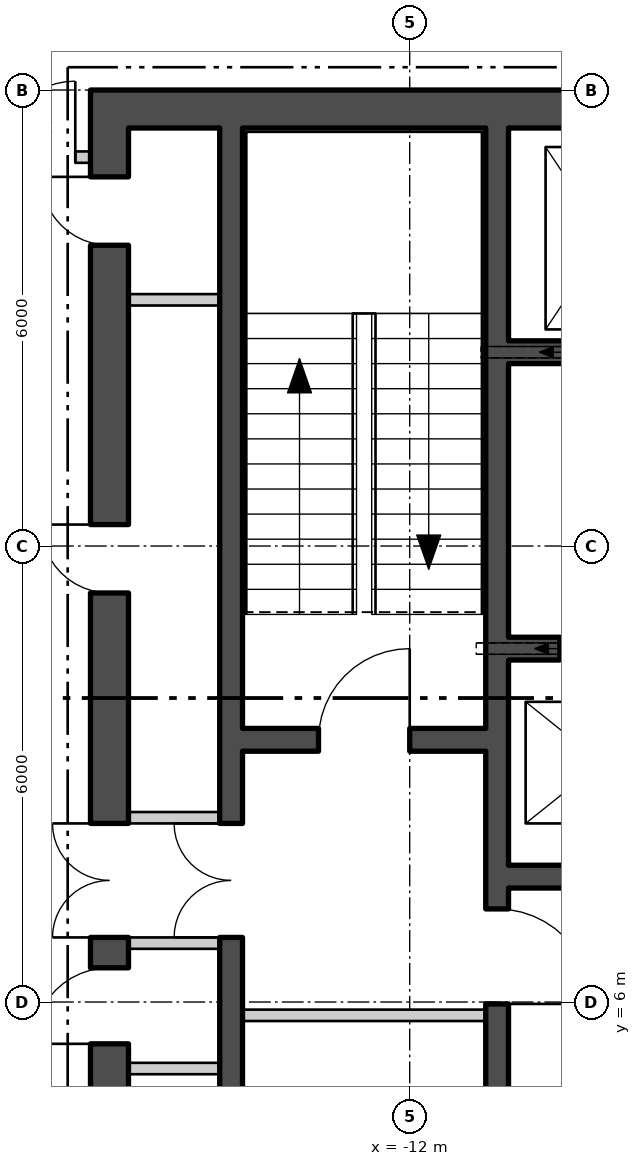
"""IFC4 building model, lengths in metres.
Left out: names, types, materials, properties, quantities, classifications, styles, units other than length and angle.
Written with IfcOpenShell. Run it as: python <this file> out.ifc"""

import sys

from ifc_helpers import new_model, si_unit, direction, frame, frame_2d, origin, place, context, subcontext, project, spatial, polyline, rectangle, outline, extrude, element, fill, save


model = new_model("IFC4")
c1 = context("Model", 3, precision=1e-05, world=origin(), true_north=direction((0.0, 1.0)))
c2 = subcontext(c1, "Body", "Model", "MODEL_VIEW")
j1 = project(units=[si_unit("LENGTHUNIT", "METRE"), si_unit("PLANEANGLEUNIT", "RADIAN")], contexts=[c1])
p1 = place(None, origin())
s1 = spatial("IfcSite", under=j1, at=p1, CompositionType="ELEMENT")
p2 = place(p1, origin())
s2 = spatial("IfcBuilding", under=s1, at=p2, CompositionType="ELEMENT")
p3 = place(p2, frame((0.0, 0.0, 139.8)))
s3 = spatial("IfcBuildingStorey", under=s2, at=p3, CompositionType="ELEMENT", Elevation=139.8)
p4 = place(p3, frame((-27.235, 12.423, -0.18), z_axis=(0.0, 0.0, 1.0), x_axis=(0.500000335318, -0.866025210188, 0.0)))
e1 = element("IfcWall", 1, at=p4, inside=s3, PredefinedType="SOLIDWALL", context=c2, shape_type="SweptSolid", body=[
    extrude(outline(polyline([(-0.13, -0.225), (45.88, -0.225), (45.62, 0.225), (0.13, 0.225), (-0.13, -0.225)])), origin(), (0.0, 0.0, 1.0), 3.68),
])
p5 = place(p4, frame((1.425, 0.0, 1.08)))
e2 = element("IfcOpeningElement", 2, at=p5, cuts=e1, PredefinedType="OPENING", context=c2, shape_type="SweptSolid", body=[
    extrude(rectangle(XDim=2.4, YDim=2.0, at=frame_2d((1.2, 1.0))), frame((0.0, 0.235, 0.0), z_axis=(0.0, -1.0, 0.0), x_axis=(1.0, 0.0, 0.0)), (0.0, 0.0, 1.0), 0.47),
])
p6 = place(p4, frame((5.895, 0.0, 1.08)))
e3 = element("IfcOpeningElement", 3, at=p6, cuts=e1, PredefinedType="OPENING", context=c2, shape_type="SweptSolid", body=[
    extrude(rectangle(XDim=2.4, YDim=2.0, at=frame_2d((1.2, 1.0))), frame((0.0, 0.235, 0.0), z_axis=(0.0, -1.0, 0.0), x_axis=(1.0, 0.0, 0.0)), (0.0, 0.0, 1.0), 0.47),
])
p7 = place(p4, frame((10.403, 0.0, 1.08)))
e4 = element("IfcOpeningElement", 4, at=p7, cuts=e1, PredefinedType="OPENING", context=c2, shape_type="SweptSolid", body=[
    extrude(rectangle(XDim=2.4, YDim=2.0, at=frame_2d((1.2, 1.0))), frame((0.0, 0.235, 0.0), z_axis=(0.0, -1.0, 0.0), x_axis=(1.0, 0.0, 0.0)), (0.0, 0.0, 1.0), 0.47),
])
p8 = place(p4, frame((14.912, 0.0, 1.08)))
e5 = element("IfcOpeningElement", 5, at=p8, cuts=e1, PredefinedType="OPENING", context=c2, shape_type="SweptSolid", body=[
    extrude(rectangle(XDim=2.4, YDim=2.0, at=frame_2d((1.2, 1.0))), frame((0.0, 0.235, 0.0), z_axis=(0.0, -1.0, 0.0), x_axis=(1.0, 0.0, 0.0)), (0.0, 0.0, 1.0), 0.47),
])
p9 = place(p4, frame((19.421, 0.0, 1.08)))
e6 = element("IfcOpeningElement", 6, at=p9, cuts=e1, PredefinedType="OPENING", context=c2, shape_type="SweptSolid", body=[
    extrude(rectangle(XDim=2.4, YDim=2.0, at=frame_2d((1.2, 1.0))), frame((0.0, 0.235, 0.0), z_axis=(0.0, -1.0, 0.0), x_axis=(1.0, 0.0, 0.0)), (0.0, 0.0, 1.0), 0.47),
])
p10 = place(p4, frame((23.929, 0.0, 1.08)))
e7 = element("IfcOpeningElement", 7, at=p10, cuts=e1, PredefinedType="OPENING", context=c2, shape_type="SweptSolid", body=[
    extrude(rectangle(XDim=2.4, YDim=2.0, at=frame_2d((1.2, 1.0))), frame((0.0, 0.235, 0.0), z_axis=(0.0, -1.0, 0.0), x_axis=(1.0, 0.0, 0.0)), (0.0, 0.0, 1.0), 0.47),
])
p11 = place(p4, frame((28.438, 0.0, 1.08)))
e8 = element("IfcOpeningElement", 8, at=p11, cuts=e1, PredefinedType="OPENING", context=c2, shape_type="SweptSolid", body=[
    extrude(rectangle(XDim=2.4, YDim=2.0, at=frame_2d((1.2, 1.0))), frame((0.0, 0.235, 0.0), z_axis=(0.0, -1.0, 0.0), x_axis=(1.0, 0.0, 0.0)), (0.0, 0.0, 1.0), 0.47),
])
p12 = place(p4, frame((32.947, 0.0, 1.08)))
e9 = element("IfcOpeningElement", 9, at=p12, cuts=e1, PredefinedType="OPENING", context=c2, shape_type="SweptSolid", body=[
    extrude(rectangle(XDim=2.4, YDim=2.0, at=frame_2d((1.2, 1.0))), frame((0.0, 0.235, 0.0), z_axis=(0.0, -1.0, 0.0), x_axis=(1.0, 0.0, 0.0)), (0.0, 0.0, 1.0), 0.47),
])
p13 = place(p4, frame((37.455, 0.0, 1.08)))
e10 = element("IfcOpeningElement", 10, at=p13, cuts=e1, PredefinedType="OPENING", context=c2, shape_type="SweptSolid", body=[
    extrude(rectangle(XDim=2.4, YDim=2.0, at=frame_2d((1.2, 1.0))), frame((0.0, 0.235, 0.0), z_axis=(0.0, -1.0, 0.0), x_axis=(1.0, 0.0, 0.0)), (0.0, 0.0, 1.0), 0.47),
])
p14 = place(p4, frame((41.925, 0.0, 1.08)))
e11 = element("IfcOpeningElement", 11, at=p14, cuts=e1, PredefinedType="OPENING", context=c2, shape_type="SweptSolid", body=[
    extrude(rectangle(XDim=2.4, YDim=2.0, at=frame_2d((1.2, 1.0))), frame((0.0, 0.235, 0.0), z_axis=(0.0, -1.0, 0.0), x_axis=(1.0, 0.0, 0.0)), (0.0, 0.0, 1.0), 0.47),
])
p15 = place(p3, frame((-16.2, 17.75, 0.0), z_axis=(0.0, 0.0, 1.0), x_axis=(1.0, 0.0, 0.0)))
e12 = element("IfcWall", 12, at=p15, inside=s3, PredefinedType="SHEAR", context=c2, shape_type="SweptSolid", body=[
    extrude(rectangle(XDim=32.4, YDim=0.5, at=frame_2d((16.2, 0.0))), origin(), (0.0, 0.0, 1.0), 3.7),
])
p16 = place(p3, frame((-15.95, 2.5, 0.0), z_axis=(0.0, 0.0, 1.0), x_axis=(0.0, 1.0, 0.0)))
e13 = element("IfcWall", 13, at=p16, inside=s3, PredefinedType="SHEAR", context=c2, shape_type="SweptSolid", body=[
    extrude(rectangle(XDim=15.0, YDim=0.5, at=frame_2d((7.5, 0.0))), origin(), (0.0, 0.0, 1.0), 3.7),
])
p17 = place(p16, frame((4.35, 0.0, 0.0)))
e14 = element("IfcOpeningElement", 14, at=p17, cuts=e13, PredefinedType="OPENING", context=c2, shape_type="SweptSolid", body=[
    extrude(rectangle(XDim=1.5, YDim=2.1, at=frame_2d((0.75, 1.05))), frame((0.0, 0.26, 0.0), z_axis=(0.0, -1.0, 0.0), x_axis=(1.0, 0.0, 0.0)), (0.0, 0.0, 1.0), 0.52),
])
p18 = place(p16, frame((0.825, 0.0, 0.0)))
e15 = element("IfcOpeningElement", 15, at=p18, cuts=e13, PredefinedType="OPENING", context=c2, shape_type="SweptSolid", body=[
    extrude(rectangle(XDim=0.9, YDim=2.1, at=frame_2d((0.45, 1.05))), frame((0.0, 0.26, 0.0), z_axis=(0.0, -1.0, 0.0), x_axis=(1.0, 0.0, 0.0)), (0.0, 0.0, 1.0), 0.52),
])
p19 = place(p16, frame((2.95, 0.0, 0.0)))
e16 = element("IfcOpeningElement", 16, at=p19, cuts=e13, PredefinedType="OPENING", context=c2, shape_type="SweptSolid", body=[
    extrude(rectangle(XDim=1.0, YDim=2.1, at=frame_2d((0.5, 1.05))), frame((0.0, 0.26, 0.0), z_axis=(0.0, -1.0, 0.0), x_axis=(1.0, 0.0, 0.0)), (0.0, 0.0, 1.0), 0.52),
])
p20 = place(p16, frame((8.882, 0.0, 0.0)))
e17 = element("IfcOpeningElement", 17, at=p20, cuts=e13, PredefinedType="OPENING", context=c2, shape_type="SweptSolid", body=[
    extrude(rectangle(XDim=0.9, YDim=2.1, at=frame_2d((0.45, 1.05))), frame((0.0, 0.26, 0.0), z_axis=(0.0, -1.0, 0.0), x_axis=(1.0, 0.0, 0.0)), (0.0, 0.0, 1.0), 0.52),
])
p21 = place(p16, frame((13.457, 0.0, 0.0)))
e18 = element("IfcOpeningElement", 18, at=p21, cuts=e13, PredefinedType="OPENING", context=c2, shape_type="SweptSolid", body=[
    extrude(rectangle(XDim=0.9, YDim=2.1, at=frame_2d((0.45, 1.05))), frame((0.0, 0.26, 0.0), z_axis=(0.0, -1.0, 0.0), x_axis=(1.0, 0.0, 0.0)), (0.0, 0.0, 1.0), 0.52),
])
p22 = place(p3, frame((-10.85, 2.5, 0.0), z_axis=(0.0, 0.0, 1.0), x_axis=(0.0, 1.0, 0.0)))
e19 = element("IfcWall", 19, at=p22, inside=s3, PredefinedType="SHEAR", context=c2, shape_type="SweptSolid", body=[
    extrude(rectangle(XDim=15.0, YDim=0.3, at=frame_2d((7.5, 0.0))), origin(), (0.0, 0.0, 1.0), 3.7),
])
p23 = place(p22, frame((3.475, 0.0, 0.0)))
e20 = element("IfcOpeningElement", 20, at=p23, cuts=e19, PredefinedType="OPENING", context=c2, shape_type="SweptSolid", body=[
    extrude(rectangle(XDim=1.25, YDim=2.1, at=frame_2d((0.625, 1.05))), frame((0.0, 0.16, 0.0), z_axis=(0.0, -1.0, 0.0), x_axis=(1.0, 0.0, 0.0)), (0.0, 0.0, 1.0), 0.32),
])
p24 = place(p22, frame((1.125, 0.0, 0.0)))
e21 = element("IfcOpeningElement", 21, at=p24, cuts=e19, PredefinedType="OPENING", context=c2, shape_type="SweptSolid", body=[
    extrude(rectangle(XDim=1.0, YDim=2.1, at=frame_2d((0.5, 1.05))), frame((0.0, 0.16, 0.0), z_axis=(0.0, -1.0, 0.0), x_axis=(1.0, 0.0, 0.0)), (0.0, 0.0, 1.0), 0.32),
])
p25 = place(p3, frame((-14.35, 2.5, 0.0), z_axis=(0.0, 0.0, 1.0), x_axis=(0.0, 1.0, 0.0)))
e22 = element("IfcWall", 22, at=p25, inside=s3, PredefinedType="SHEAR", context=c2, shape_type="SweptSolid", body=[
    extrude(rectangle(XDim=15.0, YDim=0.3, at=frame_2d((7.5, 0.0))), origin(), (0.0, 0.0, 1.0), 3.7),
])
p26 = place(p25, frame((4.35, 0.0, 0.0)))
e23 = element("IfcOpeningElement", 23, at=p26, cuts=e22, PredefinedType="OPENING", context=c2, shape_type="SweptSolid", body=[
    extrude(rectangle(XDim=1.5, YDim=2.1, at=frame_2d((0.75, 1.05))), frame((0.0, 0.16, 0.0), z_axis=(0.0, -1.0, 0.0), x_axis=(1.0, 0.0, 0.0)), (0.0, 0.0, 1.0), 0.32),
])
p27 = place(p3, frame((-14.2, 9.45, 0.0), z_axis=(0.0, 0.0, 1.0), x_axis=(1.0, 0.0, 0.0)))
e24 = element("IfcWall", 24, at=p27, inside=s3, PredefinedType="SHEAR", context=c2, shape_type="SweptSolid", body=[
    extrude(rectangle(XDim=3.2, YDim=0.3, at=frame_2d((1.6, 0.0))), origin(), (0.0, 0.0, 1.0), 3.7),
])
p28 = place(p27, frame((1.0, 0.0, 0.0)))
e25 = element("IfcOpeningElement", 25, at=p28, cuts=e24, PredefinedType="OPENING", context=c2, shape_type="SweptSolid", body=[
    extrude(rectangle(XDim=1.2, YDim=2.1, at=frame_2d((0.6, 1.05))), frame((0.0, 0.16, 0.0), z_axis=(0.0, -1.0, 0.0), x_axis=(1.0, 0.0, 0.0)), (0.0, 0.0, 1.0), 0.32),
])
p29 = place(p3, frame((-10.7, 14.55, 0.0), z_axis=(0.0, 0.0, 1.0), x_axis=(1.0, 0.0, 0.0)))
e26 = element("IfcWall", 26, at=p29, inside=s3, PredefinedType="SHEAR", context=c2, shape_type="SweptSolid", body=[
    extrude(rectangle(XDim=21.4, YDim=0.3, at=frame_2d((10.7, 0.0))), origin(), (0.0, 0.0, 1.0), 3.7),
])
p30 = place(p29, frame((0.738, 0.0, 0.0)))
e27 = element("IfcOpeningElement", 27, at=p30, cuts=e26, PredefinedType="OPENING", context=c2, shape_type="SweptSolid", body=[
    extrude(rectangle(XDim=1.1, YDim=2.1, at=frame_2d((0.55, 1.05))), frame((0.0, 0.16, 0.0), z_axis=(0.0, -1.0, 0.0), x_axis=(1.0, 0.0, 0.0)), (0.0, 0.0, 1.0), 0.32),
])
p31 = place(p29, frame((3.462, 0.0, 0.0)))
e28 = element("IfcOpeningElement", 28, at=p31, cuts=e26, PredefinedType="OPENING", context=c2, shape_type="SweptSolid", body=[
    extrude(rectangle(XDim=1.1, YDim=2.1, at=frame_2d((0.55, 1.05))), frame((0.0, 0.16, 0.0), z_axis=(0.0, -1.0, 0.0), x_axis=(1.0, 0.0, 0.0)), (0.0, 0.0, 1.0), 0.32),
])
p32 = place(p29, frame((6.138, 0.0, 0.0)))
e29 = element("IfcOpeningElement", 29, at=p32, cuts=e26, PredefinedType="OPENING", context=c2, shape_type="SweptSolid", body=[
    extrude(rectangle(XDim=1.1, YDim=2.1, at=frame_2d((0.55, 1.05))), frame((0.0, 0.16, 0.0), z_axis=(0.0, -1.0, 0.0), x_axis=(1.0, 0.0, 0.0)), (0.0, 0.0, 1.0), 0.32),
])
p33 = place(p29, frame((8.812, 0.0, 0.0)))
e30 = element("IfcOpeningElement", 30, at=p33, cuts=e26, PredefinedType="OPENING", context=c2, shape_type="SweptSolid", body=[
    extrude(rectangle(XDim=1.1, YDim=2.1, at=frame_2d((0.55, 1.05))), frame((0.0, 0.16, 0.0), z_axis=(0.0, -1.0, 0.0), x_axis=(1.0, 0.0, 0.0)), (0.0, 0.0, 1.0), 0.32),
])
p34 = place(p29, frame((19.562, 0.0, 0.0)))
e31 = element("IfcOpeningElement", 31, at=p34, cuts=e26, PredefinedType="OPENING", context=c2, shape_type="SweptSolid", body=[
    extrude(rectangle(XDim=1.1, YDim=2.1, at=frame_2d((0.55, 1.05))), frame((0.0, 0.16, 0.0), z_axis=(0.0, -1.0, 0.0), x_axis=(1.0, 0.0, 0.0)), (0.0, 0.0, 1.0), 0.32),
])
p35 = place(p29, frame((11.537, 0.0, 0.0)))
e32 = element("IfcOpeningElement", 32, at=p35, cuts=e26, PredefinedType="OPENING", context=c2, shape_type="SweptSolid", body=[
    extrude(rectangle(XDim=1.0, YDim=2.1, at=frame_2d((0.5, 1.05))), frame((0.0, 0.16, 0.0), z_axis=(0.0, -1.0, 0.0), x_axis=(1.0, 0.0, 0.0)), (0.0, 0.0, 1.0), 0.32),
])
p36 = place(p29, frame((14.213, 0.0, 0.0)))
e33 = element("IfcOpeningElement", 33, at=p36, cuts=e26, PredefinedType="OPENING", context=c2, shape_type="SweptSolid", body=[
    extrude(rectangle(XDim=1.0, YDim=2.1, at=frame_2d((0.5, 1.05))), frame((0.0, 0.16, 0.0), z_axis=(0.0, -1.0, 0.0), x_axis=(1.0, 0.0, 0.0)), (0.0, 0.0, 1.0), 0.32),
])
p37 = place(p29, frame((16.887, 0.0, 0.0)))
e34 = element("IfcOpeningElement", 34, at=p37, cuts=e26, PredefinedType="OPENING", context=c2, shape_type="SweptSolid", body=[
    extrude(rectangle(XDim=1.0, YDim=2.1, at=frame_2d((0.5, 1.05))), frame((0.0, 0.16, 0.0), z_axis=(0.0, -1.0, 0.0), x_axis=(1.0, 0.0, 0.0)), (0.0, 0.0, 1.0), 0.32),
])
p38 = place(p3, frame((-10.7, 10.65, 0.0), z_axis=(0.0, 0.0, 1.0), x_axis=(1.0, 0.0, 0.0)))
e35 = element("IfcWall", 35, at=p38, inside=s3, PredefinedType="SHEAR", context=c2, shape_type="SweptSolid", body=[
    extrude(rectangle(XDim=10.3, YDim=0.3, at=frame_2d((5.15, 0.0))), origin(), (0.0, 0.0, 1.0), 3.7),
])
p39 = place(p38, frame((0.675, 0.0, 0.0)))
e36 = element("IfcOpeningElement", 36, at=p39, cuts=e35, PredefinedType="OPENING", context=c2, shape_type="SweptSolid", body=[
    extrude(rectangle(XDim=1.1, YDim=2.1, at=frame_2d((0.55, 1.05))), frame((0.0, 0.16, 0.0), z_axis=(0.0, -1.0, 0.0), x_axis=(1.0, 0.0, 0.0)), (0.0, 0.0, 1.0), 0.32),
])
p40 = place(p38, frame((3.275, 0.0, 0.0)))
e37 = element("IfcOpeningElement", 37, at=p40, cuts=e35, PredefinedType="OPENING", context=c2, shape_type="SweptSolid", body=[
    extrude(rectangle(XDim=1.1, YDim=2.1, at=frame_2d((0.55, 1.05))), frame((0.0, 0.16, 0.0), z_axis=(0.0, -1.0, 0.0), x_axis=(1.0, 0.0, 0.0)), (0.0, 0.0, 1.0), 0.32),
])
p41 = place(p38, frame((5.825, 0.0, 0.0)))
e38 = element("IfcOpeningElement", 38, at=p41, cuts=e35, PredefinedType="OPENING", context=c2, shape_type="SweptSolid", body=[
    extrude(rectangle(XDim=1.1, YDim=2.1, at=frame_2d((0.55, 1.05))), frame((0.0, 0.16, 0.0), z_axis=(0.0, -1.0, 0.0), x_axis=(1.0, 0.0, 0.0)), (0.0, 0.0, 1.0), 0.32),
])
p42 = place(p38, frame((8.425, 0.0, 0.0)))
e39 = element("IfcOpeningElement", 39, at=p42, cuts=e35, PredefinedType="OPENING", context=c2, shape_type="SweptSolid", body=[
    extrude(rectangle(XDim=1.0, YDim=2.1, at=frame_2d((0.5, 1.05))), frame((0.0, 0.16, 0.0), z_axis=(0.0, -1.0, 0.0), x_axis=(1.0, 0.0, 0.0)), (0.0, 0.0, 1.0), 0.32),
])
p43 = place(p3, frame((-10.7, 7.65, 0.0), z_axis=(0.0, 0.0, 1.0), x_axis=(1.0, 0.0, 0.0)))
e40 = element("IfcWall", 40, at=p43, inside=s3, PredefinedType="SHEAR", context=c2, shape_type="SweptSolid", body=[
    extrude(rectangle(XDim=10.3, YDim=0.3, at=frame_2d((5.15, 0.0))), origin(), (0.0, 0.0, 1.0), 3.7),
])
p44 = place(p3, frame((-14.2, 5.825, 0.0), z_axis=(0.0, 0.0, 1.0), x_axis=(1.0, 0.0, 0.0)))
e41 = element("IfcWall", 41, at=p44, inside=s3, PredefinedType="PARTITIONING", context=c2, shape_type="SweptSolid", body=[
    extrude(rectangle(XDim=3.2, YDim=0.15, at=frame_2d((1.6, 0.0))), origin(), (0.0, 0.0, 1.0), 3.7),
])
for number, where, z_axis, x_axis in (
    (42, (-15.7, 6.775, 0.0), (0.0, 0.0, 1.0), (1.0, 0.0, 0.0)),
    (43, (-15.7, 8.425, 0.0), (0.0, 0.0, 1.0), (1.0, 0.0, 0.0)),
    (44, (-15.7, 5.125, 0.0), (0.0, 0.0, 1.0), (1.0, 0.0, 0.0)),
    (45, (-15.7, 15.24, 0.0), (0.0, 0.0, 1.0), (1.0, 0.0, 0.0)),
):
    element("IfcWall", number, at=place(p3, frame(where, z_axis=z_axis, x_axis=x_axis)), inside=s3, PredefinedType="PARTITIONING", context=c2, shape_type="SweptSolid", body=[
        extrude(rectangle(XDim=1.2, YDim=0.15, at=frame_2d((0.6, 0.0))), origin(), (0.0, 0.0, 1.0), 3.7),
    ])
p45 = place(p3, frame((-17.959, 17.117, 0.0), z_axis=(0.0, 0.0, 1.0), x_axis=(1.0, 0.0, 0.0)))
e46 = element("IfcWall", 46, at=p45, inside=s3, PredefinedType="PARTITIONING", context=c2, shape_type="SweptSolid", body=[
    extrude(rectangle(XDim=1.759, YDim=0.15, at=frame_2d((0.879, 0.0))), origin(), (0.0, 0.0, 1.0), 3.7),
])
p46 = place(p45, frame((0.559, 0.0, 0.0)))
e47 = element("IfcOpeningElement", 47, at=p46, cuts=e46, PredefinedType="OPENING", context=c2, shape_type="SweptSolid", body=[
    extrude(rectangle(XDim=1.0, YDim=2.1, at=frame_2d((0.5, 1.05))), frame((0.0, 0.085, 0.0), z_axis=(0.0, -1.0, 0.0), x_axis=(1.0, 0.0, 0.0)), (0.0, 0.0, 1.0), 0.17),
])
p47 = place(p39, origin())
e48 = element("IfcDoor", 48, at=p47, inside=s3, OperationType="SLIDING_TO_LEFT", PredefinedType="DOOR", context=c2, shape_type="SweptSolid", body=[
    extrude(rectangle(XDim=1.1, YDim=2.1, at=frame_2d((0.55, 1.05))), frame((0.0, 0.025, 0.0), z_axis=(0.0, -1.0, 0.0), x_axis=(1.0, 0.0, 0.0)), (0.0, 0.0, 1.0), 0.05),
])
fill(e36, e48)
p48 = place(p28, origin())
e49 = element("IfcDoor", 49, at=p48, inside=s3, OperationType="SINGLE_SWING_LEFT", PredefinedType="DOOR", context=c2, shape_type="SweptSolid", body=[
    extrude(rectangle(XDim=1.2, YDim=2.1, at=frame_2d((0.6, 1.05))), frame((0.0, 0.025, 0.0), z_axis=(0.0, -1.0, 0.0), x_axis=(1.0, 0.0, 0.0)), (0.0, 0.0, 1.0), 0.05),
])
fill(e25, e49)
p49 = place(p23, origin())
e50 = element("IfcDoor", 50, at=p49, inside=s3, OperationType="SINGLE_SWING_LEFT", PredefinedType="DOOR", context=c2, shape_type="SweptSolid", body=[
    extrude(rectangle(XDim=1.25, YDim=2.1, at=frame_2d((0.625, 1.05))), frame((0.0, 0.025, 0.0), z_axis=(0.0, -1.0, 0.0), x_axis=(1.0, 0.0, 0.0)), (0.0, 0.0, 1.0), 0.05),
])
fill(e20, e50)
p50 = place(p26, origin())
e51 = element("IfcDoor", 51, at=p50, inside=s3, OperationType="DOUBLE_DOOR_SINGLE_SWING", PredefinedType="DOOR", context=c2, shape_type="SweptSolid", body=[
    extrude(rectangle(XDim=1.5, YDim=2.1, at=frame_2d((0.75, 1.05))), frame((0.0, 0.025, 0.0), z_axis=(0.0, -1.0, 0.0), x_axis=(1.0, 0.0, 0.0)), (0.0, 0.0, 1.0), 0.05),
])
fill(e23, e51)
p51 = place(p17, origin())
e52 = element("IfcDoor", 52, at=p51, inside=s3, OperationType="DOUBLE_DOOR_SINGLE_SWING", PredefinedType="DOOR", context=c2, shape_type="SweptSolid", body=[
    extrude(rectangle(XDim=1.5, YDim=2.1, at=frame_2d((0.75, 1.05))), frame((0.0, 0.025, 0.0), z_axis=(0.0, -1.0, 0.0), x_axis=(1.0, 0.0, 0.0)), (0.0, 0.0, 1.0), 0.05),
])
fill(e14, e52)
p52 = place(p19, origin())
e53 = element("IfcDoor", 53, at=p52, inside=s3, OperationType="SINGLE_SWING_RIGHT", PredefinedType="DOOR", context=c2, shape_type="SweptSolid", body=[
    extrude(rectangle(XDim=1.0, YDim=2.1, at=frame_2d((0.5, 1.05))), frame((0.0, 0.025, 0.0), z_axis=(0.0, -1.0, 0.0), x_axis=(1.0, 0.0, 0.0)), (0.0, 0.0, 1.0), 0.05),
])
fill(e16, e53)
p53 = place(p20, origin())
e54 = element("IfcDoor", 54, at=p53, inside=s3, OperationType="SINGLE_SWING_LEFT", PredefinedType="DOOR", context=c2, shape_type="SweptSolid", body=[
    extrude(rectangle(XDim=0.9, YDim=2.1, at=frame_2d((0.45, 1.05))), frame((0.0, 0.025, 0.0), z_axis=(0.0, -1.0, 0.0), x_axis=(1.0, 0.0, 0.0)), (0.0, 0.0, 1.0), 0.05),
])
fill(e17, e54)
p54 = place(p21, origin())
e55 = element("IfcDoor", 55, at=p54, inside=s3, OperationType="SINGLE_SWING_LEFT", PredefinedType="DOOR", context=c2, shape_type="SweptSolid", body=[
    extrude(rectangle(XDim=0.9, YDim=2.1, at=frame_2d((0.45, 1.05))), frame((0.0, 0.025, 0.0), z_axis=(0.0, -1.0, 0.0), x_axis=(1.0, 0.0, 0.0)), (0.0, 0.0, 1.0), 0.05),
])
fill(e18, e55)
p55 = place(p46, origin())
e56 = element("IfcDoor", 56, at=p55, inside=s3, OperationType="SINGLE_SWING_LEFT", PredefinedType="DOOR", context=c2, shape_type="SweptSolid", body=[
    extrude(rectangle(XDim=1.0, YDim=2.1, at=frame_2d((0.5, 1.05))), frame((0.0, 0.025, 0.0), z_axis=(0.0, -1.0, 0.0), x_axis=(1.0, 0.0, 0.0)), (0.0, 0.0, 1.0), 0.05),
])
fill(e47, e56)
save(model, sys.argv[1])
